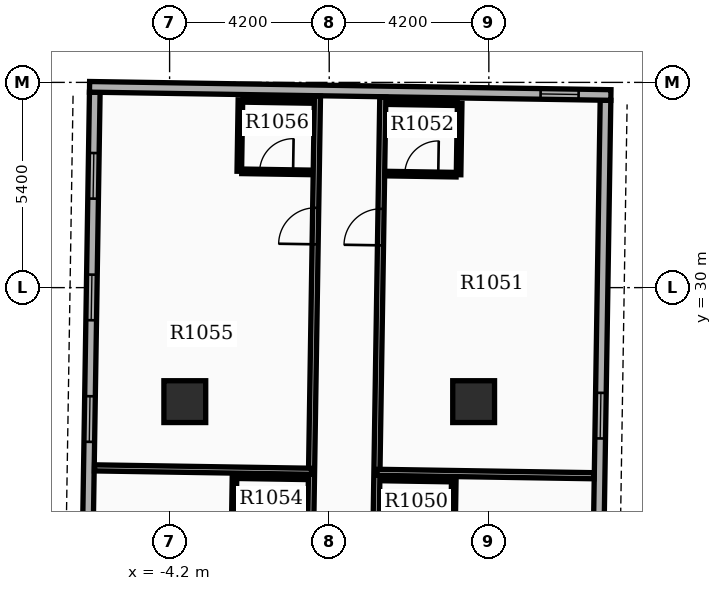
"""IFC4 building model, lengths in metres.
Left out: names, types, materials, properties, quantities, classifications, styles, units other than length and angle.
Written with IfcOpenShell. Run it as: python <this file> out.ifc"""

import sys

from ifc_helpers import new_model, si_unit, direction, frame, frame_2d, origin, origin_2d, place, context, subcontext, project, spatial, rectangle, extrude, element, fill, save


model = new_model("IFC4")
c1 = context("Model", 3, precision=1e-05, world=origin(), true_north=direction((0.0, 1.0)))
c2 = subcontext(c1, "Body", "Model", "MODEL_VIEW")
j1 = project(units=[si_unit("LENGTHUNIT", "METRE"), si_unit("PLANEANGLEUNIT", "RADIAN")], contexts=[c1])
p1 = place(None, origin())
s1 = spatial("IfcSite", under=j1, at=p1, CompositionType="ELEMENT")
p2 = place(p1, origin())
s2 = spatial("IfcBuilding", under=s1, at=p2, CompositionType="ELEMENT")
p3 = place(p2, frame((0.0, 0.0, 67.8)))
s3 = spatial("IfcBuildingStorey", under=s2, at=p3, CompositionType="ELEMENT", Elevation=67.8)
for number, where, z_axis, x_axis in (
    (1, (-3.8, 27.0, 0.0), (0.0, 0.0, 1.0), (1.0, 0.0, 0.0)),
    (2, (3.8, 27.0, 0.0), (0.0, 0.0, 1.0), (1.0, 0.0, 0.0)),
):
    element("IfcColumn", number, at=place(p3, frame(where, z_axis=z_axis, x_axis=x_axis)), inside=s3, PredefinedType="COLUMN", context=c2, shape_type="SweptSolid", body=[
        extrude(rectangle(XDim=1.1, YDim=1.1, at=origin_2d()), origin(), (0.0, 0.0, 1.0), 3.9),
    ])
p4 = place(p3, frame((6.954, 14.833, 0.0), z_axis=(0.0, 0.0, 1.0), x_axis=(0.015705059908, 0.999876667941, 0.0)))
e3 = element("IfcWall", 3, at=p4, inside=s3, PredefinedType="STANDARD", context=c2, shape_type="SweptSolid", body=[
    extrude(rectangle(XDim=20.1, YDim=0.28, at=frame_2d((10.05, 0.0))), origin(), (0.0, 0.0, 1.0), 2.91),
])
p5 = place(p4, frame((1.6, 0.0, 0.8)))
e4 = element("IfcOpeningElement", 4, at=p5, cuts=e3, PredefinedType="OPENING", context=c2, shape_type="SweptSolid", body=[
    extrude(rectangle(XDim=1.2, YDim=1.6, at=frame_2d((0.6, 0.8))), frame((0.0, 0.15, 0.0), z_axis=(0.0, -1.0, 0.0), x_axis=(1.0, 0.0, 0.0)), (0.0, 0.0, 1.0), 0.3),
])
p6 = place(p4, frame((4.8, 0.0, 0.8)))
e5 = element("IfcOpeningElement", 5, at=p6, cuts=e3, PredefinedType="OPENING", context=c2, shape_type="SweptSolid", body=[
    extrude(rectangle(XDim=1.2, YDim=1.6, at=frame_2d((0.6, 0.8))), frame((0.0, 0.15, 0.0), z_axis=(0.0, -1.0, 0.0), x_axis=(1.0, 0.0, 0.0)), (0.0, 0.0, 1.0), 0.3),
])
p7 = place(p4, frame((8.0, 0.0, 0.8)))
e6 = element("IfcOpeningElement", 6, at=p7, cuts=e3, PredefinedType="OPENING", context=c2, shape_type="SweptSolid", body=[
    extrude(rectangle(XDim=1.2, YDim=1.6, at=frame_2d((0.6, 0.8))), frame((0.0, 0.15, 0.0), z_axis=(0.0, -1.0, 0.0), x_axis=(1.0, 0.0, 0.0)), (0.0, 0.0, 1.0), 0.3),
])
p8 = place(p4, frame((11.2, 0.0, 0.8)))
e7 = element("IfcOpeningElement", 7, at=p8, cuts=e3, PredefinedType="OPENING", context=c2, shape_type="SweptSolid", body=[
    extrude(rectangle(XDim=1.2, YDim=1.6, at=frame_2d((0.6, 0.8))), frame((0.0, 0.15, 0.0), z_axis=(0.0, -1.0, 0.0), x_axis=(1.0, 0.0, 0.0)), (0.0, 0.0, 1.0), 0.3),
])
p9 = place(p3, frame((-6.169, 35.141, 0.0), z_axis=(0.0, 0.0, 1.0), x_axis=(-0.01571739401, -0.999876474133, 0.0)))
e8 = element("IfcWall", 8, at=p9, inside=s3, PredefinedType="STANDARD", context=c2, shape_type="SweptSolid", body=[
    extrude(rectangle(XDim=20.1, YDim=0.28, at=frame_2d((10.05, 0.0))), origin(), (0.0, 0.0, 1.0), 2.91),
])
p10 = place(p9, frame((1.6, 0.0, 0.8)))
e9 = element("IfcOpeningElement", 9, at=p10, cuts=e8, PredefinedType="OPENING", context=c2, shape_type="SweptSolid", body=[
    extrude(rectangle(XDim=1.2, YDim=1.6, at=frame_2d((0.6, 0.8))), frame((0.0, 0.15, 0.0), z_axis=(0.0, -1.0, 0.0), x_axis=(1.0, 0.0, 0.0)), (0.0, 0.0, 1.0), 0.3),
])
p11 = place(p9, frame((4.8, 0.0, 0.8)))
e10 = element("IfcOpeningElement", 10, at=p11, cuts=e8, PredefinedType="OPENING", context=c2, shape_type="SweptSolid", body=[
    extrude(rectangle(XDim=1.2, YDim=1.6, at=frame_2d((0.6, 0.8))), frame((0.0, 0.15, 0.0), z_axis=(0.0, -1.0, 0.0), x_axis=(1.0, 0.0, 0.0)), (0.0, 0.0, 1.0), 0.3),
])
p12 = place(p9, frame((8.0, 0.0, 0.8)))
e11 = element("IfcOpeningElement", 11, at=p12, cuts=e8, PredefinedType="OPENING", context=c2, shape_type="SweptSolid", body=[
    extrude(rectangle(XDim=1.2, YDim=1.6, at=frame_2d((0.6, 0.8))), frame((0.0, 0.15, 0.0), z_axis=(0.0, -1.0, 0.0), x_axis=(1.0, 0.0, 0.0)), (0.0, 0.0, 1.0), 0.3),
])
p13 = place(p9, frame((11.2, 0.0, 0.8)))
e12 = element("IfcOpeningElement", 12, at=p13, cuts=e8, PredefinedType="OPENING", context=c2, shape_type="SweptSolid", body=[
    extrude(rectangle(XDim=1.2, YDim=1.6, at=frame_2d((0.6, 0.8))), frame((0.0, 0.15, 0.0), z_axis=(0.0, -1.0, 0.0), x_axis=(1.0, 0.0, 0.0)), (0.0, 0.0, 1.0), 0.3),
])
p14 = place(p3, frame((7.412, 35.068, 0.0), z_axis=(0.0, 0.0, 1.0), x_axis=(-0.999876549481, 0.015712599986, 0.0)))
e13 = element("IfcWall", 13, at=p14, inside=s3, PredefinedType="STANDARD", context=c2, shape_type="SweptSolid", body=[
    extrude(rectangle(XDim=13.72, YDim=0.28, at=frame_2d((6.86, 0.0))), origin(), (0.0, 0.0, 1.0), 2.91),
])
p15 = place(p14, frame((0.85, 0.0, 0.85)))
e14 = element("IfcOpeningElement", 14, at=p15, cuts=e13, PredefinedType="OPENING", context=c2, shape_type="SweptSolid", body=[
    extrude(rectangle(XDim=1.0, YDim=1.5, at=frame_2d((0.5, 0.75))), frame((0.0, 0.15, 0.0), z_axis=(0.0, -1.0, 0.0), x_axis=(1.0, 0.0, 0.0)), (0.0, 0.0, 1.0), 0.3),
])
p16 = place(p3, frame((1.093, 14.835, 0.0), z_axis=(0.0, 0.0, 1.0), x_axis=(0.015713987169, 0.999876527681, 0.0)))
e15 = element("IfcWall", 15, at=p16, inside=s3, PredefinedType="PARTITIONING", context=c2, shape_type="SweptSolid", body=[
    extrude(rectangle(XDim=20.182, YDim=0.16, at=frame_2d((10.091, 0.0))), origin(), (0.0, 0.0, 1.0), 2.9),
])
p17 = place(p16, frame((1.106, 0.0, 0.0)))
e16 = element("IfcOpeningElement", 16, at=p17, cuts=e15, PredefinedType="OPENING", context=c2, shape_type="SweptSolid", body=[
    extrude(rectangle(XDim=0.96, YDim=2.15, at=frame_2d((0.48, 1.075))), frame((0.0, 0.09, 0.0), z_axis=(0.0, -1.0, 0.0), x_axis=(1.0, 0.0, 0.0)), (0.0, 0.0, 1.0), 0.18),
])
p18 = place(p16, frame((16.28, 0.0, 0.0)))
e17 = element("IfcOpeningElement", 17, at=p18, cuts=e15, PredefinedType="OPENING", context=c2, shape_type="SweptSolid", body=[
    extrude(rectangle(XDim=0.96, YDim=2.15, at=frame_2d((0.48, 1.075))), frame((0.0, 0.09, 0.0), z_axis=(0.0, -1.0, 0.0), x_axis=(1.0, 0.0, 0.0)), (0.0, 0.0, 1.0), 0.18),
])
p19 = place(p3, frame((1.255, 25.14, 0.0), z_axis=(0.0, 0.0, 1.0), x_axis=(0.999876298183, -0.0157285833, 0.0)))
e18 = element("IfcWall", 18, at=p19, inside=s3, PredefinedType="PARTITIONING", context=c2, shape_type="SweptSolid", body=[
    extrude(rectangle(XDim=5.712, YDim=0.16, at=frame_2d((2.856, 0.0))), origin(), (0.0, 0.0, 1.0), 2.9),
])
p20 = place(p3, frame((1.393, 24.978, 0.0), z_axis=(0.0, 0.0, 1.0), x_axis=(0.999876836305, -0.015694337248, 0.0)))
e19 = element("IfcWall", 19, at=p20, inside=s3, PredefinedType="PARTITIONING", context=c2, shape_type="SweptSolid", body=[
    extrude(rectangle(XDim=1.82, YDim=0.12, at=frame_2d((0.91, 0.0))), origin(), (0.0, 0.0, 1.0), 2.9),
])
p21 = place(p3, frame((3.248, 23.069, 0.0), z_axis=(0.0, 0.0, 1.0), x_axis=(0.015714386166, 0.99987652141, 0.0)))
e20 = element("IfcWall", 20, at=p21, inside=s3, PredefinedType="PARTITIONING", context=c2, shape_type="SweptSolid", body=[
    extrude(rectangle(XDim=1.88, YDim=0.12, at=frame_2d((0.94, 0.0))), origin(), (0.0, 0.0, 1.0), 2.9),
])
p22 = place(p3, frame((1.519, 33.0, 0.0), z_axis=(0.0, 0.0, 1.0), x_axis=(0.999876836305, -0.015694337248, 0.0)))
e21 = element("IfcWall", 21, at=p22, inside=s3, PredefinedType="PARTITIONING", context=c2, shape_type="SweptSolid", body=[
    extrude(rectangle(XDim=1.82, YDim=0.12, at=frame_2d((0.91, 0.0))), origin(), (0.0, 0.0, 1.0), 2.9),
])
p23 = place(p22, frame((0.47, 0.0, 0.0)))
e22 = element("IfcOpeningElement", 22, at=p23, cuts=e21, PredefinedType="OPENING", context=c2, shape_type="SweptSolid", body=[
    extrude(rectangle(XDim=0.88, YDim=2.1, at=frame_2d((0.44, 1.05))), frame((0.0, 0.07, 0.0), z_axis=(0.0, -1.0, 0.0), x_axis=(1.0, 0.0, 0.0)), (0.0, 0.0, 1.0), 0.14),
])
p24 = place(p3, frame((1.548, 34.88, 0.0), z_axis=(0.0, 0.0, 1.0), x_axis=(0.999876836305, -0.015694337248, 0.0)))
e23 = element("IfcWall", 23, at=p24, inside=s3, PredefinedType="PARTITIONING", context=c2, shape_type="SweptSolid", body=[
    extrude(rectangle(XDim=1.82, YDim=0.12, at=frame_2d((0.91, 0.0))), origin(), (0.0, 0.0, 1.0), 2.9),
])
p25 = place(p3, frame((3.403, 32.971, 0.0), z_axis=(0.0, 0.0, 1.0), x_axis=(0.015714386166, 0.99987652141, 0.0)))
e24 = element("IfcWall", 24, at=p25, inside=s3, PredefinedType="PARTITIONING", context=c2, shape_type="SweptSolid", body=[
    extrude(rectangle(XDim=1.88, YDim=0.12, at=frame_2d((0.94, 0.0))), origin(), (0.0, 0.0, 1.0), 2.9),
])
p26 = place(p3, frame((-0.627, 14.862, 0.0), z_axis=(0.0, 0.0, 1.0), x_axis=(0.015713987169, 0.999876527681, 0.0)))
e25 = element("IfcWall", 25, at=p26, inside=s3, PredefinedType="PARTITIONING", context=c2, shape_type="SweptSolid", body=[
    extrude(rectangle(XDim=20.182, YDim=0.16, at=frame_2d((10.091, 0.0))), origin(), (0.0, 0.0, 1.0), 2.9),
])
p27 = place(p26, frame((1.106, 0.0, 0.0)))
e26 = element("IfcOpeningElement", 26, at=p27, cuts=e25, PredefinedType="OPENING", context=c2, shape_type="SweptSolid", body=[
    extrude(rectangle(XDim=0.96, YDim=2.15, at=frame_2d((0.48, 1.075))), frame((0.0, 0.09, 0.0), z_axis=(0.0, -1.0, 0.0), x_axis=(1.0, 0.0, 0.0)), (0.0, 0.0, 1.0), 0.18),
])
p28 = place(p26, frame((16.28, 0.0, 0.0)))
e27 = element("IfcOpeningElement", 27, at=p28, cuts=e25, PredefinedType="OPENING", context=c2, shape_type="SweptSolid", body=[
    extrude(rectangle(XDim=0.96, YDim=2.15, at=frame_2d((0.48, 1.075))), frame((0.0, 0.09, 0.0), z_axis=(0.0, -1.0, 0.0), x_axis=(1.0, 0.0, 0.0)), (0.0, 0.0, 1.0), 0.18),
])
p29 = place(p3, frame((-0.465, 25.167, 0.0), z_axis=(0.0, 0.0, 1.0), x_axis=(-0.999876969438, 0.015685853115, 0.0)))
e28 = element("IfcWall", 28, at=p29, inside=s3, PredefinedType="PARTITIONING", context=c2, shape_type="SweptSolid", body=[
    extrude(rectangle(XDim=5.712, YDim=0.16, at=frame_2d((2.856, 0.0))), origin(), (0.0, 0.0, 1.0), 2.9),
])
p30 = place(p3, frame((-2.427, 25.038, 0.0), z_axis=(0.0, 0.0, 1.0), x_axis=(0.999876836305, -0.015694337248, 0.0)))
e29 = element("IfcWall", 29, at=p30, inside=s3, PredefinedType="PARTITIONING", context=c2, shape_type="SweptSolid", body=[
    extrude(rectangle(XDim=1.82, YDim=0.12, at=frame_2d((0.91, 0.0))), origin(), (0.0, 0.0, 1.0), 2.9),
])
p31 = place(p3, frame((-2.521, 23.159, 0.0), z_axis=(0.0, 0.0, 1.0), x_axis=(0.01571234584, 0.999876553475, 0.0)))
e30 = element("IfcWall", 30, at=p31, inside=s3, PredefinedType="PARTITIONING", context=c2, shape_type="SweptSolid", body=[
    extrude(rectangle(XDim=1.88, YDim=0.12, at=frame_2d((0.94, 0.0))), origin(), (0.0, 0.0, 1.0), 2.9),
])
p32 = place(p3, frame((-2.301, 33.06, 0.0), z_axis=(0.0, 0.0, 1.0), x_axis=(0.999874722342, -0.015828443418, 0.0)))
e31 = element("IfcWall", 31, at=p32, inside=s3, PredefinedType="PARTITIONING", context=c2, shape_type="SweptSolid", body=[
    extrude(rectangle(XDim=1.82, YDim=0.12, at=frame_2d((0.91, 0.0))), origin(), (0.0, 0.0, 1.0), 2.9),
])
p33 = place(p32, frame((0.47, 0.0, 0.0)))
e32 = element("IfcOpeningElement", 32, at=p33, cuts=e31, PredefinedType="OPENING", context=c2, shape_type="SweptSolid", body=[
    extrude(rectangle(XDim=0.88, YDim=2.1, at=frame_2d((0.44, 1.05))), frame((0.0, 0.07, 0.0), z_axis=(0.0, -1.0, 0.0), x_axis=(1.0, 0.0, 0.0)), (0.0, 0.0, 1.0), 0.14),
])
p34 = place(p3, frame((-2.271, 34.94, 0.0), z_axis=(0.0, 0.0, 1.0), x_axis=(0.999876836305, -0.015694337248, 0.0)))
e33 = element("IfcWall", 33, at=p34, inside=s3, PredefinedType="PARTITIONING", context=c2, shape_type="SweptSolid", body=[
    extrude(rectangle(XDim=1.82, YDim=0.12, at=frame_2d((0.91, 0.0))), origin(), (0.0, 0.0, 1.0), 2.9),
])
p35 = place(p3, frame((-2.366, 33.061, 0.0), z_axis=(0.0, 0.0, 1.0), x_axis=(0.015714386166, 0.99987652141, 0.0)))
e34 = element("IfcWall", 34, at=p35, inside=s3, PredefinedType="PARTITIONING", context=c2, shape_type="SweptSolid", body=[
    extrude(rectangle(XDim=1.88, YDim=0.12, at=frame_2d((0.94, 0.0))), origin(), (0.0, 0.0, 1.0), 2.9),
])
p36 = place(p8, origin())
e35 = element("IfcWindow", 35, at=p36, inside=s3, PartitioningType="SINGLE_PANEL", PredefinedType="WINDOW", context=c2, shape_type="SweptSolid", body=[
    extrude(rectangle(XDim=1.2, YDim=1.6, at=frame_2d((0.6, 0.8))), frame((0.0, 0.03, 0.0), z_axis=(0.0, -1.0, 0.0), x_axis=(1.0, 0.0, 0.0)), (0.0, 0.0, 1.0), 0.06),
])
fill(e7, e35)
p37 = place(p10, origin())
e36 = element("IfcWindow", 36, at=p37, inside=s3, PartitioningType="SINGLE_PANEL", PredefinedType="WINDOW", context=c2, shape_type="SweptSolid", body=[
    extrude(rectangle(XDim=1.2, YDim=1.6, at=frame_2d((0.6, 0.8))), frame((0.0, 0.03, 0.0), z_axis=(0.0, -1.0, 0.0), x_axis=(1.0, 0.0, 0.0)), (0.0, 0.0, 1.0), 0.06),
])
fill(e9, e36)
p38 = place(p11, origin())
e37 = element("IfcWindow", 37, at=p38, inside=s3, PartitioningType="SINGLE_PANEL", PredefinedType="WINDOW", context=c2, shape_type="SweptSolid", body=[
    extrude(rectangle(XDim=1.2, YDim=1.6, at=frame_2d((0.6, 0.8))), frame((0.0, 0.03, 0.0), z_axis=(0.0, -1.0, 0.0), x_axis=(1.0, 0.0, 0.0)), (0.0, 0.0, 1.0), 0.06),
])
fill(e10, e37)
p39 = place(p12, origin())
e38 = element("IfcWindow", 38, at=p39, inside=s3, PartitioningType="SINGLE_PANEL", PredefinedType="WINDOW", context=c2, shape_type="SweptSolid", body=[
    extrude(rectangle(XDim=1.2, YDim=1.6, at=frame_2d((0.6, 0.8))), frame((0.0, 0.03, 0.0), z_axis=(0.0, -1.0, 0.0), x_axis=(1.0, 0.0, 0.0)), (0.0, 0.0, 1.0), 0.06),
])
fill(e11, e38)
p40 = place(p15, origin())
e39 = element("IfcWindow", 39, at=p40, inside=s3, PartitioningType="SINGLE_PANEL", PredefinedType="WINDOW", context=c2, shape_type="SweptSolid", body=[
    extrude(rectangle(XDim=1.0, YDim=1.5, at=frame_2d((0.5, 0.75))), frame((0.0, 0.03, 0.0), z_axis=(0.0, -1.0, 0.0), x_axis=(1.0, 0.0, 0.0)), (0.0, 0.0, 1.0), 0.06),
])
fill(e14, e39)
p41 = place(p18, origin())
e40 = element("IfcDoor", 40, at=p41, inside=s3, OperationType="SINGLE_SWING_LEFT", PredefinedType="DOOR", context=c2, shape_type="SweptSolid", body=[
    extrude(rectangle(XDim=0.96, YDim=2.15, at=frame_2d((0.48, 1.075))), frame((0.0, 0.025, 0.0), z_axis=(0.0, -1.0, 0.0), x_axis=(1.0, 0.0, 0.0)), (0.0, 0.0, 1.0), 0.05),
])
fill(e17, e40)
p42 = place(p23, origin())
e41 = element("IfcDoor", 41, at=p42, inside=s3, OperationType="SINGLE_SWING_RIGHT", PredefinedType="DOOR", context=c2, shape_type="SweptSolid", body=[
    extrude(rectangle(XDim=0.88, YDim=2.1, at=frame_2d((0.44, 1.05))), frame((0.0, 0.025, 0.0), z_axis=(0.0, -1.0, 0.0), x_axis=(1.0, 0.0, 0.0)), (0.0, 0.0, 1.0), 0.05),
])
fill(e22, e41)
p43 = place(p28, origin())
e42 = element("IfcDoor", 42, at=p43, inside=s3, OperationType="SINGLE_SWING_LEFT", PredefinedType="DOOR", context=c2, shape_type="SweptSolid", body=[
    extrude(rectangle(XDim=0.96, YDim=2.15, at=frame_2d((0.48, 1.075))), frame((0.0, 0.025, 0.0), z_axis=(0.0, -1.0, 0.0), x_axis=(1.0, 0.0, 0.0)), (0.0, 0.0, 1.0), 0.05),
])
fill(e27, e42)
p44 = place(p33, origin())
e43 = element("IfcDoor", 43, at=p44, inside=s3, OperationType="SINGLE_SWING_RIGHT", PredefinedType="DOOR", context=c2, shape_type="SweptSolid", body=[
    extrude(rectangle(XDim=0.88, YDim=2.1, at=frame_2d((0.44, 1.05))), frame((0.0, 0.025, 0.0), z_axis=(0.0, -1.0, 0.0), x_axis=(1.0, 0.0, 0.0)), (0.0, 0.0, 1.0), 0.05),
])
fill(e32, e43)
save(model, sys.argv[1])
